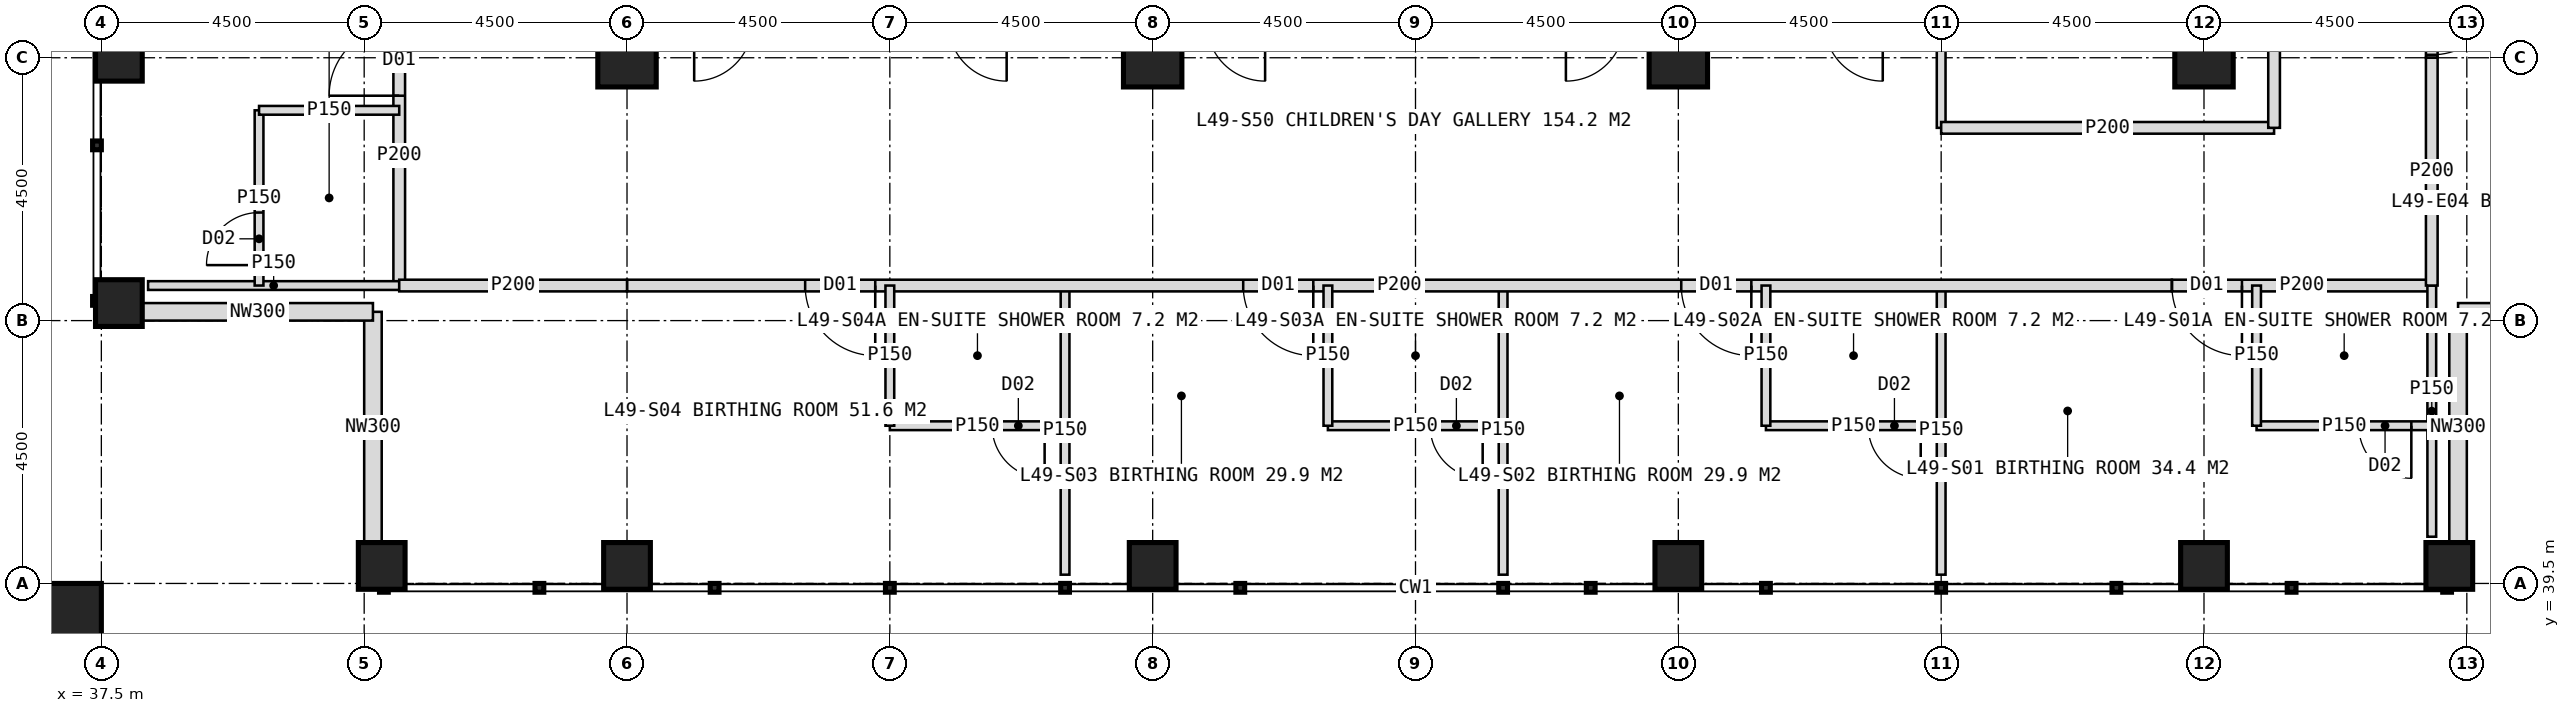
"""IFC4 building model, lengths in metres.
Left out: names, types, materials, properties, quantities, classifications, styles, units other than length and angle.
Written with IfcOpenShell. Run it as: python <this file> out.ifc"""

import sys

from ifc_helpers import new_model, si_unit, direction, frame, frame_2d, origin, origin_2d, place, context, subcontext, project, spatial, rectangle, hollow_rectangle, extrude, element, fill, save


model = new_model("IFC4")
c1 = context("Model", 3, precision=1e-05, world=origin(), true_north=direction((0.0, 1.0)))
c2 = subcontext(c1, "Body", "Model", "MODEL_VIEW")
j1 = project(units=[si_unit("LENGTHUNIT", "METRE"), si_unit("PLANEANGLEUNIT", "RADIAN")], contexts=[c1])
p1 = place(None, origin())
s1 = spatial("IfcSite", under=j1, at=p1, CompositionType="ELEMENT")
p2 = place(p1, origin())
s2 = spatial("IfcBuilding", under=s1, at=p2, CompositionType="ELEMENT")
p3 = place(p2, frame((0.0, 0.0, 205.0)))
s3 = spatial("IfcBuildingStorey", under=s2, at=p3, CompositionType="ELEMENT", Elevation=205.0)
for number, where, z_axis, x_axis in (
    (1, (46.5, 48.5, 0.0), (0.0, 0.0, 1.0), (1.0, 0.0, 0.0)),
    (2, (73.5, 48.5, 0.0), (0.0, 0.0, 1.0), (1.0, 0.0, 0.0)),
    (3, (55.5, 48.5, 0.0), (0.0, 0.0, 1.0), (1.0, 0.0, 0.0)),
    (4, (64.5, 48.5, 0.0), (0.0, 0.0, 1.0), (1.0, 0.0, 0.0)),
):
    element("IfcColumn", number, at=place(p3, frame(where, z_axis=z_axis, x_axis=x_axis)), inside=s3, PredefinedType="COLUMN", context=c2, shape_type="SweptSolid", body=[
        extrude(hollow_rectangle(XDim=1.0, YDim=1.0, WallThickness=0.1, at=origin_2d()), origin(), (0.0, 0.0, 1.0), 4.0),
    ])
for number, where, z_axis, x_axis in (
    (5, (42.3, 39.8, 0.0), (0.0, 0.0, 1.0), (1.0, 0.0, 0.0)),
    (6, (37.8, 44.3, 0.0), (0.0, 0.0, 1.0), (1.0, 0.0, 0.0)),
    (7, (46.5, 39.8, 0.0), (0.0, 0.0, 1.0), (1.0, 0.0, 0.0)),
    (8, (37.8, 48.5, 0.0), (0.0, 0.0, 1.0), (1.0, 0.0, 0.0)),
    (9, (55.5, 39.8, 0.0), (0.0, 0.0, 1.0), (1.0, 0.0, 0.0)),
    (10, (64.5, 39.8, 0.0), (0.0, 0.0, 1.0), (1.0, 0.0, 0.0)),
    (11, (73.5, 39.8, 0.0), (0.0, 0.0, 1.0), (1.0, 0.0, 0.0)),
    (12, (77.7, 39.8, 0.0), (0.0, 0.0, 1.0), (1.0, 0.0, 0.0)),
):
    element("IfcColumn", number, at=place(p3, frame(where, z_axis=z_axis, x_axis=x_axis)), inside=s3, PredefinedType="COLUMN", context=c2, shape_type="SweptSolid", body=[
        extrude(hollow_rectangle(XDim=0.8, YDim=0.8, WallThickness=0.08, at=origin_2d()), origin(), (0.0, 0.0, 1.0), 4.0),
    ])
p4 = place(p3, frame((36.9, 38.9, 0.0), z_axis=(0.0, 0.0, 1.0), x_axis=(1.0, 0.0, 0.0)))
e13 = element("IfcColumn", 13, at=p4, inside=s3, PredefinedType="COLUMN", context=c2, shape_type="SweptSolid", body=[
    extrude(hollow_rectangle(XDim=1.2, YDim=1.2, WallThickness=0.07, at=origin_2d()), origin(), (0.0, 0.0, 1.0), 4.0),
])
for number, where, z_axis, x_axis in (
    (14, (42.15, 40.2, 0.0), (0.0, 0.0, 1.0), (0.0, 1.0, 0.0)),
    (15, (42.15, 44.15, 0.0), (0.0, 0.0, 1.0), (-1.0, 0.0, 0.0)),
    (16, (81.8, 44.15, 0.0), (0.0, 0.0, 1.0), (-1.0, 0.0, 0.0)),
    (17, (77.85, 44.15, 0.0), (0.0, 0.0, 1.0), (0.0, -1.0, 0.0)),
):
    element("IfcWall", number, at=place(p3, frame(where, z_axis=z_axis, x_axis=x_axis)), inside=s3, PredefinedType="ELEMENTEDWALL", context=c2, shape_type="SweptSolid", body=[
        extrude(rectangle(XDim=3.95, YDim=0.3, at=frame_2d((1.975, 0.0))), origin(), (0.0, 0.0, 1.0), 2.85),
    ])
p5 = place(p3, frame((42.6, 44.6, 0.0), z_axis=(0.0, 0.0, 1.0), x_axis=(0.0, 1.0, 0.0)))
e18 = element("IfcWall", 18, at=p5, inside=s3, PredefinedType="PARTITIONING", context=c2, shape_type="SweptSolid", body=[
    extrude(rectangle(XDim=4.45, YDim=0.2, at=frame_2d((2.225, 0.0))), origin(), (0.0, 0.0, 1.0), 2.85),
])
p6 = place(p5, frame((3.25, 0.0, 0.0)))
e19 = element("IfcOpeningElement", 19, at=p6, cuts=e18, PredefinedType="OPENING", context=c2, shape_type="SweptSolid", body=[
    extrude(rectangle(XDim=1.2, YDim=2.2, at=frame_2d((0.6, 1.1))), frame((0.0, 0.11, 0.0), z_axis=(0.0, -1.0, 0.0), x_axis=(1.0, 0.0, 0.0)), (0.0, 0.0, 1.0), 0.22),
])
p7 = place(p3, frame((42.6, 44.6, 0.0), z_axis=(0.0, 0.0, 1.0), x_axis=(-1.0, 0.0, 0.0)))
e20 = element("IfcWall", 20, at=p7, inside=s3, PredefinedType="PARTITIONING", context=c2, shape_type="SweptSolid", body=[
    extrude(rectangle(XDim=4.3, YDim=0.15, at=frame_2d((2.15, 0.0))), origin(), (0.0, 0.0, 1.0), 2.85),
])
p8 = place(p3, frame((40.2, 44.6, 0.0), z_axis=(0.0, 0.0, 1.0), x_axis=(0.0, 1.0, 0.0)))
e21 = element("IfcWall", 21, at=p8, inside=s3, PredefinedType="PARTITIONING", context=c2, shape_type="SweptSolid", body=[
    extrude(rectangle(XDim=3.0, YDim=0.15, at=frame_2d((1.5, 0.0))), origin(), (0.0, 0.0, 1.0), 3.75),
])
p9 = place(p8, frame((0.35, 0.0, 0.0)))
e22 = element("IfcOpeningElement", 22, at=p9, cuts=e21, PredefinedType="OPENING", context=c2, shape_type="SweptSolid", body=[
    extrude(rectangle(XDim=0.9, YDim=2.1, at=frame_2d((0.45, 1.05))), frame((0.0, 0.085, 0.0), z_axis=(0.0, -1.0, 0.0), x_axis=(1.0, 0.0, 0.0)), (0.0, 0.0, 1.0), 0.17),
])
p10 = place(p3, frame((42.6, 47.6, 0.0), z_axis=(0.0, 0.0, 1.0), x_axis=(-1.0, 0.0, 0.0)))
e23 = element("IfcWall", 23, at=p10, inside=s3, PredefinedType="PARTITIONING", context=c2, shape_type="SweptSolid", body=[
    extrude(rectangle(XDim=2.4, YDim=0.15, at=frame_2d((1.2, 0.0))), origin(), (0.0, 0.0, 1.0), 3.75),
])
for number, where, z_axis, x_axis in (
    (24, (69.0, 44.6, 0.0), (0.0, 0.0, 1.0), (0.0, -1.0, 0.0)),
    (25, (61.5, 44.6, 0.0), (0.0, 0.0, 1.0), (0.0, -1.0, 0.0)),
    (26, (54.0, 44.6, 0.0), (0.0, 0.0, 1.0), (0.0, -1.0, 0.0)),
):
    element("IfcWall", number, at=place(p3, frame(where, z_axis=z_axis, x_axis=x_axis)), inside=s3, PredefinedType="PARTITIONING", context=c2, shape_type="SweptSolid", body=[
        extrude(rectangle(XDim=4.95, YDim=0.15, at=frame_2d((2.475, 0.0))), origin(), (0.0, 0.0, 1.0), 3.75),
    ])
p11 = place(p3, frame((77.4, 44.6, 0.0), z_axis=(0.0, 0.0, 1.0), x_axis=(-1.0, 0.0, 0.0)))
e27 = element("IfcWall", 27, at=p11, inside=s3, PredefinedType="PARTITIONING", context=c2, shape_type="SweptSolid", body=[
    extrude(rectangle(XDim=4.45, YDim=0.2, at=frame_2d((2.225, 0.0))), origin(), (0.0, 0.0, 1.0), 2.85),
])
p12 = place(p11, frame((3.25, 0.0, 0.0)))
e28 = element("IfcOpeningElement", 28, at=p12, cuts=e27, PredefinedType="OPENING", context=c2, shape_type="SweptSolid", body=[
    extrude(rectangle(XDim=1.2, YDim=2.2, at=frame_2d((0.6, 1.1))), frame((0.0, 0.11, 0.0), z_axis=(0.0, -1.0, 0.0), x_axis=(1.0, 0.0, 0.0)), (0.0, 0.0, 1.0), 0.22),
])
p13 = place(p3, frame((72.95, 44.6, 0.0), z_axis=(0.0, 0.0, 1.0), x_axis=(-1.0, 0.0, 0.0)))
e29 = element("IfcWall", 29, at=p13, inside=s3, PredefinedType="PARTITIONING", context=c2, shape_type="SweptSolid", body=[
    extrude(rectangle(XDim=26.45, YDim=0.2, at=frame_2d((13.225, 0.0))), origin(), (0.0, 0.0, 1.0), 3.75),
])
p14 = place(p13, frame((7.2, 0.0, 0.0)))
e30 = element("IfcOpeningElement", 30, at=p14, cuts=e29, PredefinedType="OPENING", context=c2, shape_type="SweptSolid", body=[
    extrude(rectangle(XDim=1.2, YDim=2.2, at=frame_2d((0.6, 1.1))), frame((0.0, 0.11, 0.0), z_axis=(0.0, -1.0, 0.0), x_axis=(1.0, 0.0, 0.0)), (0.0, 0.0, 1.0), 0.22),
])
p15 = place(p13, frame((14.7, 0.0, 0.0)))
e31 = element("IfcOpeningElement", 31, at=p15, cuts=e29, PredefinedType="OPENING", context=c2, shape_type="SweptSolid", body=[
    extrude(rectangle(XDim=1.2, YDim=2.2, at=frame_2d((0.6, 1.1))), frame((0.0, 0.11, 0.0), z_axis=(0.0, -1.0, 0.0), x_axis=(1.0, 0.0, 0.0)), (0.0, 0.0, 1.0), 0.22),
])
p16 = place(p13, frame((22.2, 0.0, 0.0)))
e32 = element("IfcOpeningElement", 32, at=p16, cuts=e29, PredefinedType="OPENING", context=c2, shape_type="SweptSolid", body=[
    extrude(rectangle(XDim=1.2, YDim=2.2, at=frame_2d((0.6, 1.1))), frame((0.0, 0.11, 0.0), z_axis=(0.0, -1.0, 0.0), x_axis=(1.0, 0.0, 0.0)), (0.0, 0.0, 1.0), 0.22),
])
p17 = place(p3, frame((46.5, 44.6, 0.0), z_axis=(0.0, 0.0, 1.0), x_axis=(-1.0, 0.0, 0.0)))
e33 = element("IfcWall", 33, at=p17, inside=s3, PredefinedType="PARTITIONING", context=c2, shape_type="SweptSolid", body=[
    extrude(rectangle(XDim=3.9, YDim=0.2, at=frame_2d((1.95, 0.0))), origin(), (0.0, 0.0, 1.0), 2.85),
])
p18 = place(p3, frame((77.4, 44.6, 0.0), z_axis=(0.0, 0.0, 1.0), x_axis=(0.0, -1.0, 0.0)))
e34 = element("IfcWall", 34, at=p18, inside=s3, PredefinedType="PARTITIONING", context=c2, shape_type="SweptSolid", body=[
    extrude(rectangle(XDim=4.3, YDim=0.15, at=frame_2d((2.15, 0.0))), origin(), (0.0, 0.0, 1.0), 2.85),
])
p19 = place(p3, frame((77.4, 42.2, 0.0), z_axis=(0.0, 0.0, 1.0), x_axis=(-1.0, 0.0, 0.0)))
e35 = element("IfcWall", 35, at=p19, inside=s3, PredefinedType="PARTITIONING", context=c2, shape_type="SweptSolid", body=[
    extrude(rectangle(XDim=3.0, YDim=0.15, at=frame_2d((1.5, 0.0))), origin(), (0.0, 0.0, 1.0), 3.75),
])
p20 = place(p19, frame((0.35, 0.0, 0.0)))
e36 = element("IfcOpeningElement", 36, at=p20, cuts=e35, PredefinedType="OPENING", context=c2, shape_type="SweptSolid", body=[
    extrude(rectangle(XDim=0.9, YDim=2.1, at=frame_2d((0.45, 1.05))), frame((0.0, 0.085, 0.0), z_axis=(0.0, -1.0, 0.0), x_axis=(1.0, 0.0, 0.0)), (0.0, 0.0, 1.0), 0.17),
])
p21 = place(p3, frame((74.4, 44.6, 0.0), z_axis=(0.0, 0.0, 1.0), x_axis=(0.0, -1.0, 0.0)))
e37 = element("IfcWall", 37, at=p21, inside=s3, PredefinedType="PARTITIONING", context=c2, shape_type="SweptSolid", body=[
    extrude(rectangle(XDim=2.4, YDim=0.15, at=frame_2d((1.2, 0.0))), origin(), (0.0, 0.0, 1.0), 3.75),
])
p22 = place(p3, frame((69.0, 42.2, 0.0), z_axis=(0.0, 0.0, 1.0), x_axis=(-1.0, 0.0, 0.0)))
e38 = element("IfcWall", 38, at=p22, inside=s3, PredefinedType="PARTITIONING", context=c2, shape_type="SweptSolid", body=[
    extrude(rectangle(XDim=3.0, YDim=0.15, at=frame_2d((1.5, 0.0))), origin(), (0.0, 0.0, 1.0), 3.75),
])
p23 = place(p22, frame((0.35, 0.0, 0.0)))
e39 = element("IfcOpeningElement", 39, at=p23, cuts=e38, PredefinedType="OPENING", context=c2, shape_type="SweptSolid", body=[
    extrude(rectangle(XDim=0.9, YDim=2.1, at=frame_2d((0.45, 1.05))), frame((0.0, 0.085, 0.0), z_axis=(0.0, -1.0, 0.0), x_axis=(1.0, 0.0, 0.0)), (0.0, 0.0, 1.0), 0.17),
])
p24 = place(p3, frame((66.0, 44.6, 0.0), z_axis=(0.0, 0.0, 1.0), x_axis=(0.0, -1.0, 0.0)))
e40 = element("IfcWall", 40, at=p24, inside=s3, PredefinedType="PARTITIONING", context=c2, shape_type="SweptSolid", body=[
    extrude(rectangle(XDim=2.4, YDim=0.15, at=frame_2d((1.2, 0.0))), origin(), (0.0, 0.0, 1.0), 3.75),
])
p25 = place(p3, frame((61.5, 42.2, 0.0), z_axis=(0.0, 0.0, 1.0), x_axis=(-1.0, 0.0, 0.0)))
e41 = element("IfcWall", 41, at=p25, inside=s3, PredefinedType="PARTITIONING", context=c2, shape_type="SweptSolid", body=[
    extrude(rectangle(XDim=3.0, YDim=0.15, at=frame_2d((1.5, 0.0))), origin(), (0.0, 0.0, 1.0), 3.75),
])
p26 = place(p25, frame((0.35, 0.0, 0.0)))
e42 = element("IfcOpeningElement", 42, at=p26, cuts=e41, PredefinedType="OPENING", context=c2, shape_type="SweptSolid", body=[
    extrude(rectangle(XDim=0.9, YDim=2.1, at=frame_2d((0.45, 1.05))), frame((0.0, 0.085, 0.0), z_axis=(0.0, -1.0, 0.0), x_axis=(1.0, 0.0, 0.0)), (0.0, 0.0, 1.0), 0.17),
])
p27 = place(p3, frame((58.5, 44.6, 0.0), z_axis=(0.0, 0.0, 1.0), x_axis=(0.0, -1.0, 0.0)))
e43 = element("IfcWall", 43, at=p27, inside=s3, PredefinedType="PARTITIONING", context=c2, shape_type="SweptSolid", body=[
    extrude(rectangle(XDim=2.4, YDim=0.15, at=frame_2d((1.2, 0.0))), origin(), (0.0, 0.0, 1.0), 3.75),
])
p28 = place(p3, frame((54.0, 42.2, 0.0), z_axis=(0.0, 0.0, 1.0), x_axis=(-1.0, 0.0, 0.0)))
e44 = element("IfcWall", 44, at=p28, inside=s3, PredefinedType="PARTITIONING", context=c2, shape_type="SweptSolid", body=[
    extrude(rectangle(XDim=3.0, YDim=0.15, at=frame_2d((1.5, 0.0))), origin(), (0.0, 0.0, 1.0), 3.75),
])
p29 = place(p28, frame((0.35, 0.0, 0.0)))
e45 = element("IfcOpeningElement", 45, at=p29, cuts=e44, PredefinedType="OPENING", context=c2, shape_type="SweptSolid", body=[
    extrude(rectangle(XDim=0.9, YDim=2.1, at=frame_2d((0.45, 1.05))), frame((0.0, 0.085, 0.0), z_axis=(0.0, -1.0, 0.0), x_axis=(1.0, 0.0, 0.0)), (0.0, 0.0, 1.0), 0.17),
])
p30 = place(p3, frame((51.0, 44.6, 0.0), z_axis=(0.0, 0.0, 1.0), x_axis=(0.0, -1.0, 0.0)))
e46 = element("IfcWall", 46, at=p30, inside=s3, PredefinedType="PARTITIONING", context=c2, shape_type="SweptSolid", body=[
    extrude(rectangle(XDim=2.4, YDim=0.15, at=frame_2d((1.2, 0.0))), origin(), (0.0, 0.0, 1.0), 3.75),
])
p31 = place(p3, frame((69.0, 53.0, 0.0), z_axis=(0.0, 0.0, 1.0), x_axis=(0.0, -1.0, 0.0)))
e47 = element("IfcWall", 47, at=p31, inside=s3, PredefinedType="PARTITIONING", context=c2, shape_type="SweptSolid", body=[
    extrude(rectangle(XDim=5.7, YDim=0.15, at=frame_2d((2.85, 0.0))), origin(), (0.0, 0.0, 1.0), 3.75),
])
p32 = place(p3, frame((74.7, 47.3, 0.0), z_axis=(0.0, 0.0, 1.0), x_axis=(-1.0, 0.0, 0.0)))
e48 = element("IfcWall", 48, at=p32, inside=s3, PredefinedType="PARTITIONING", context=c2, shape_type="SweptSolid", body=[
    extrude(rectangle(XDim=5.7, YDim=0.2, at=frame_2d((2.85, 0.0))), origin(), (0.0, 0.0, 1.0), 3.75),
])
p33 = place(p3, frame((77.4, 74.95, 0.0), z_axis=(0.0, 0.0, 1.0), x_axis=(0.0, -1.0, 0.0)))
e49 = element("IfcWall", 49, at=p33, inside=s3, PredefinedType="PARTITIONING", context=c2, shape_type="SweptSolid", body=[
    extrude(rectangle(XDim=26.45, YDim=0.2, at=frame_2d((13.225, 0.0))), origin(), (0.0, 0.0, 1.0), 3.75),
])
p34 = place(p33, frame((7.2, 0.0, 0.0)))
e50 = element("IfcOpeningElement", 50, at=p34, cuts=e49, PredefinedType="OPENING", context=c2, shape_type="SweptSolid", body=[
    extrude(rectangle(XDim=1.2, YDim=2.2, at=frame_2d((0.6, 1.1))), frame((0.0, 0.11, 0.0), z_axis=(0.0, -1.0, 0.0), x_axis=(1.0, 0.0, 0.0)), (0.0, 0.0, 1.0), 0.22),
])
p35 = place(p33, frame((16.2, 0.0, 0.0)))
e51 = element("IfcOpeningElement", 51, at=p35, cuts=e49, PredefinedType="OPENING", context=c2, shape_type="SweptSolid", body=[
    extrude(rectangle(XDim=1.2, YDim=2.2, at=frame_2d((0.6, 1.1))), frame((0.0, 0.11, 0.0), z_axis=(0.0, -1.0, 0.0), x_axis=(1.0, 0.0, 0.0)), (0.0, 0.0, 1.0), 0.22),
])
p36 = place(p33, frame((25.2, 0.0, 0.0)))
e52 = element("IfcOpeningElement", 52, at=p36, cuts=e49, PredefinedType="OPENING", context=c2, shape_type="SweptSolid", body=[
    extrude(rectangle(XDim=1.2, YDim=2.2, at=frame_2d((0.6, 1.1))), frame((0.0, 0.11, 0.0), z_axis=(0.0, -1.0, 0.0), x_axis=(1.0, 0.0, 0.0)), (0.0, 0.0, 1.0), 0.22),
])
p37 = place(p3, frame((77.4, 48.5, 0.0), z_axis=(0.0, 0.0, 1.0), x_axis=(0.0, -1.0, 0.0)))
e53 = element("IfcWall", 53, at=p37, inside=s3, PredefinedType="PARTITIONING", context=c2, shape_type="SweptSolid", body=[
    extrude(rectangle(XDim=3.9, YDim=0.2, at=frame_2d((1.95, 0.0))), origin(), (0.0, 0.0, 1.0), 2.85),
])
p38 = place(p3, frame((74.7, 62.0, 0.0), z_axis=(0.0, 0.0, 1.0), x_axis=(0.0, -1.0, 0.0)))
e54 = element("IfcWall", 54, at=p38, inside=s3, PredefinedType="PARTITIONING", context=c2, shape_type="SweptSolid", body=[
    extrude(rectangle(XDim=14.7, YDim=0.2, at=frame_2d((7.35, 0.0))), origin(), (0.0, 0.0, 1.0), 3.75),
])
p39 = place(p38, frame((1.45, 0.0, 0.0)))
e55 = element("IfcOpeningElement", 55, at=p39, cuts=e54, PredefinedType="OPENING", context=c2, shape_type="SweptSolid", body=[
    extrude(rectangle(XDim=1.0, YDim=2.1, at=frame_2d((0.5, 1.05))), frame((0.0, 0.11, 0.0), z_axis=(0.0, -1.0, 0.0), x_axis=(1.0, 0.0, 0.0)), (0.0, 0.0, 1.0), 0.22),
])
p40 = place(p38, frame((11.35, 0.0, 0.0)))
e56 = element("IfcOpeningElement", 56, at=p40, cuts=e54, PredefinedType="OPENING", context=c2, shape_type="SweptSolid", body=[
    extrude(rectangle(XDim=1.0, YDim=2.1, at=frame_2d((0.5, 1.05))), frame((0.0, 0.11, 0.0), z_axis=(0.0, -1.0, 0.0), x_axis=(1.0, 0.0, 0.0)), (0.0, 0.0, 1.0), 0.22),
])
p41 = place(p6, origin())
e57 = element("IfcDoor", 57, at=p41, inside=s3, OperationType="SINGLE_SWING_LEFT", PredefinedType="DOOR", context=c2, shape_type="SweptSolid", body=[
    extrude(rectangle(XDim=1.2, YDim=2.2, at=frame_2d((0.6, 1.1))), frame((0.0, 0.025, 0.0), z_axis=(0.0, -1.0, 0.0), x_axis=(1.0, 0.0, 0.0)), (0.0, 0.0, 1.0), 0.05),
])
fill(e19, e57)
p42 = place(p9, origin())
e58 = element("IfcDoor", 58, at=p42, inside=s3, OperationType="SINGLE_SWING_LEFT", PredefinedType="DOOR", context=c2, shape_type="SweptSolid", body=[
    extrude(rectangle(XDim=0.9, YDim=2.1, at=frame_2d((0.45, 1.05))), frame((0.0, 0.025, 0.0), z_axis=(0.0, -1.0, 0.0), x_axis=(1.0, 0.0, 0.0)), (0.0, 0.0, 1.0), 0.05),
])
fill(e22, e58)
p43 = place(p12, origin())
e59 = element("IfcDoor", 59, at=p43, inside=s3, OperationType="SINGLE_SWING_LEFT", PredefinedType="DOOR", context=c2, shape_type="SweptSolid", body=[
    extrude(rectangle(XDim=1.2, YDim=2.2, at=frame_2d((0.6, 1.1))), frame((0.0, 0.025, 0.0), z_axis=(0.0, -1.0, 0.0), x_axis=(1.0, 0.0, 0.0)), (0.0, 0.0, 1.0), 0.05),
])
fill(e28, e59)
p44 = place(p20, origin())
e60 = element("IfcDoor", 60, at=p44, inside=s3, OperationType="SINGLE_SWING_LEFT", PredefinedType="DOOR", context=c2, shape_type="SweptSolid", body=[
    extrude(rectangle(XDim=0.9, YDim=2.1, at=frame_2d((0.45, 1.05))), frame((0.0, 0.025, 0.0), z_axis=(0.0, -1.0, 0.0), x_axis=(1.0, 0.0, 0.0)), (0.0, 0.0, 1.0), 0.05),
])
fill(e36, e60)
p45 = place(p14, origin())
e61 = element("IfcDoor", 61, at=p45, inside=s3, OperationType="SINGLE_SWING_LEFT", PredefinedType="DOOR", context=c2, shape_type="SweptSolid", body=[
    extrude(rectangle(XDim=1.2, YDim=2.2, at=frame_2d((0.6, 1.1))), frame((0.0, 0.025, 0.0), z_axis=(0.0, -1.0, 0.0), x_axis=(1.0, 0.0, 0.0)), (0.0, 0.0, 1.0), 0.05),
])
fill(e30, e61)
p46 = place(p23, origin())
e62 = element("IfcDoor", 62, at=p46, inside=s3, OperationType="SINGLE_SWING_LEFT", PredefinedType="DOOR", context=c2, shape_type="SweptSolid", body=[
    extrude(rectangle(XDim=0.9, YDim=2.1, at=frame_2d((0.45, 1.05))), frame((0.0, 0.025, 0.0), z_axis=(0.0, -1.0, 0.0), x_axis=(1.0, 0.0, 0.0)), (0.0, 0.0, 1.0), 0.05),
])
fill(e39, e62)
p47 = place(p15, origin())
e63 = element("IfcDoor", 63, at=p47, inside=s3, OperationType="SINGLE_SWING_LEFT", PredefinedType="DOOR", context=c2, shape_type="SweptSolid", body=[
    extrude(rectangle(XDim=1.2, YDim=2.2, at=frame_2d((0.6, 1.1))), frame((0.0, 0.025, 0.0), z_axis=(0.0, -1.0, 0.0), x_axis=(1.0, 0.0, 0.0)), (0.0, 0.0, 1.0), 0.05),
])
fill(e31, e63)
p48 = place(p26, origin())
e64 = element("IfcDoor", 64, at=p48, inside=s3, OperationType="SINGLE_SWING_LEFT", PredefinedType="DOOR", context=c2, shape_type="SweptSolid", body=[
    extrude(rectangle(XDim=0.9, YDim=2.1, at=frame_2d((0.45, 1.05))), frame((0.0, 0.025, 0.0), z_axis=(0.0, -1.0, 0.0), x_axis=(1.0, 0.0, 0.0)), (0.0, 0.0, 1.0), 0.05),
])
fill(e42, e64)
p49 = place(p16, origin())
e65 = element("IfcDoor", 65, at=p49, inside=s3, OperationType="SINGLE_SWING_LEFT", PredefinedType="DOOR", context=c2, shape_type="SweptSolid", body=[
    extrude(rectangle(XDim=1.2, YDim=2.2, at=frame_2d((0.6, 1.1))), frame((0.0, 0.025, 0.0), z_axis=(0.0, -1.0, 0.0), x_axis=(1.0, 0.0, 0.0)), (0.0, 0.0, 1.0), 0.05),
])
fill(e32, e65)
p50 = place(p29, origin())
e66 = element("IfcDoor", 66, at=p50, inside=s3, OperationType="SINGLE_SWING_LEFT", PredefinedType="DOOR", context=c2, shape_type="SweptSolid", body=[
    extrude(rectangle(XDim=0.9, YDim=2.1, at=frame_2d((0.45, 1.05))), frame((0.0, 0.025, 0.0), z_axis=(0.0, -1.0, 0.0), x_axis=(1.0, 0.0, 0.0)), (0.0, 0.0, 1.0), 0.05),
])
fill(e45, e66)
p51 = place(p36, origin())
e67 = element("IfcDoor", 67, at=p51, inside=s3, OperationType="SINGLE_SWING_LEFT", PredefinedType="DOOR", context=c2, shape_type="SweptSolid", body=[
    extrude(rectangle(XDim=1.2, YDim=2.2, at=frame_2d((0.6, 1.1))), frame((0.0, 0.025, 0.0), z_axis=(0.0, -1.0, 0.0), x_axis=(1.0, 0.0, 0.0)), (0.0, 0.0, 1.0), 0.05),
])
fill(e52, e67)
save(model, sys.argv[1])
